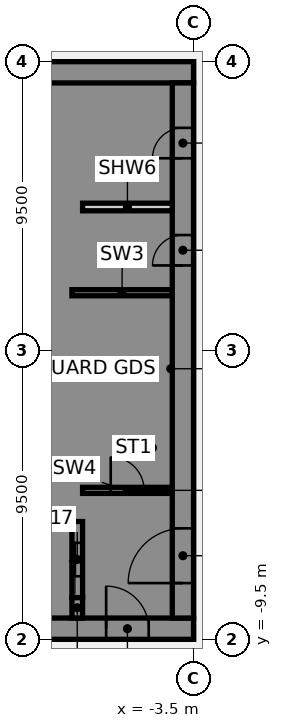
"""IFC4 building model, lengths in metres.
Left out: names, types, materials, properties, quantities, classifications, styles, units other than length and angle.
Written with IfcOpenShell. Run it as: python <this file> out.ifc"""

import sys

from ifc_helpers import new_model, si_unit, direction, frame, frame_2d, origin, place, context, subcontext, project, spatial, polyline, rectangle, outline, extrude, element, fill, save


model = new_model("IFC4")
c1 = context("Model", 3, precision=1e-05, world=origin(), true_north=direction((0.0, 1.0)))
c2 = subcontext(c1, "Body", "Model", "MODEL_VIEW")
j1 = project(units=[si_unit("LENGTHUNIT", "METRE"), si_unit("PLANEANGLEUNIT", "RADIAN")], contexts=[c1])
p1 = place(None, origin())
s1 = spatial("IfcSite", under=j1, at=p1, CompositionType="ELEMENT")
p2 = place(p1, origin())
s2 = spatial("IfcBuilding", under=s1, at=p2, CompositionType="ELEMENT")
p3 = place(p2, frame((0.0, 0.0, 75.25)))
s3 = spatial("IfcBuildingStorey", under=s2, at=p3, CompositionType="ELEMENT", Elevation=75.25)
p4 = place(p3, frame((-16.5, -9.15, 0.0), z_axis=(0.0, 0.0, 1.0), x_axis=(1.0, 0.0, 0.0)))
e1 = element("IfcWall", 1, at=p4, inside=s3, PredefinedType="SHEAR", context=c2, shape_type="SweptSolid", body=[
    extrude(rectangle(XDim=13.0, YDim=0.7, at=frame_2d((6.5, 0.0))), origin(), (0.0, 0.0, 1.0), 3.57),
])
p5 = place(p4, frame((4.15, 0.0, 0.0)))
e2 = element("IfcOpeningElement", 2, at=p5, cuts=e1, PredefinedType="OPENING", context=c2, shape_type="SweptSolid", body=[
    extrude(rectangle(XDim=1.4, YDim=2.1, at=frame_2d((0.7, 1.05))), frame((0.0, 0.36, 0.0), z_axis=(0.0, -1.0, 0.0), x_axis=(1.0, 0.0, 0.0)), (0.0, 0.0, 1.0), 0.72),
])
p6 = place(p4, frame((10.125, 0.0, 0.0)))
e3 = element("IfcOpeningElement", 3, at=p6, cuts=e1, PredefinedType="OPENING", context=c2, shape_type="SweptSolid", body=[
    extrude(rectangle(XDim=1.4, YDim=2.1, at=frame_2d((0.7, 1.05))), frame((0.0, 0.36, 0.0), z_axis=(0.0, -1.0, 0.0), x_axis=(1.0, 0.0, 0.0)), (0.0, 0.0, 1.0), 0.72),
])
p7 = place(p3, frame((-16.5, 9.15, 0.0), z_axis=(0.0, 0.0, 1.0), x_axis=(1.0, 0.0, 0.0)))
e4 = element("IfcWall", 4, at=p7, inside=s3, PredefinedType="SHEAR", context=c2, shape_type="SweptSolid", body=[
    extrude(rectangle(XDim=13.0, YDim=0.7, at=frame_2d((6.5, 0.0))), origin(), (0.0, 0.0, 1.0), 3.57),
])
p8 = place(p3, origin())
e5 = element("IfcWall", 5, at=p8, inside=s3, PredefinedType="SHEAR", context=c2, shape_type="SweptSolid", body=[
    extrude(outline(polyline([(-9.8, -5.375), (-9.8, -5.625), (-7.5, -5.625), (-7.15, -5.625), (-7.15, 8.8), (-7.5, 8.8), (-9.8, 8.8), (-9.8, 8.125), (-7.5, 8.125), (-7.5, 5.625), (-9.8, 5.625), (-9.8, 5.375), (-7.5, 5.375), (-7.5, 2.875), (-9.8, 2.875), (-9.8, 2.625), (-7.5, 2.625), (-7.5, 0.125), (-9.8, 0.125), (-9.8, -0.125), (-7.5, -0.125), (-7.5, -2.625), (-9.8, -2.625), (-9.8, -2.875), (-7.5, -2.875), (-7.5, -5.375), (-9.8, -5.375)])), origin(), (0.0, 0.0, 1.0), 3.57),
])
p9 = place(p3, origin())
e6 = element("IfcWall", 6, at=p9, inside=s3, PredefinedType="SHEAR", context=c2, shape_type="SweptSolid", body=[
    extrude(outline(polyline([(-7.5, -8.125), (-9.55, -8.125), (-9.55, -5.625), (-9.8, -5.625), (-9.8, -8.125), (-9.8, -8.8), (-7.5, -8.8), (-7.5, -8.125)])), origin(), (0.0, 0.0, 1.0), 3.57),
])
p10 = place(p3, frame((-7.325, -8.8, 0.0), z_axis=(0.0, 0.0, 1.0), x_axis=(0.0, 1.0, 0.0)))
e7 = element("IfcWall", 7, at=p10, inside=s3, PredefinedType="SHEAR", context=c2, shape_type="SweptSolid", body=[
    extrude(rectangle(XDim=0.675, YDim=0.35, at=frame_2d((0.337, 0.0))), origin(), (0.0, 0.0, 1.0), 3.57),
])
p11 = place(p3, frame((-7.5, 1.9, 0.0), z_axis=(0.0, 0.0, 1.0), x_axis=(1.0, 0.0, 0.0)))
e8 = element("IfcWall", 8, at=p11, inside=s3, PredefinedType="SHEAR", context=c2, shape_type="SweptSolid", body=[
    extrude(rectangle(XDim=3.3, YDim=0.2, at=frame_2d((1.65, 0.0))), origin(), (0.0, 0.0, 1.0), 3.57),
])
p12 = place(p3, frame((-7.325, -8.125, 0.0), z_axis=(0.0, 0.0, 1.0), x_axis=(0.0, 1.0, 0.0)))
e9 = element("IfcWall", 9, at=p12, inside=s3, PredefinedType="SHEAR", context=c2, shape_type="SweptSolid", body=[
    extrude(rectangle(XDim=2.5, YDim=0.35, at=frame_2d((1.25, 0.0))), origin(), (0.0, 0.0, 1.0), 3.57),
])
p13 = place(p12, frame((0.7, 0.0, 0.0)))
e10 = element("IfcOpeningElement", 10, at=p13, cuts=e9, PredefinedType="OPENING", context=c2, shape_type="SweptSolid", body=[
    extrude(rectangle(XDim=1.1, YDim=2.1, at=frame_2d((0.55, 1.05))), frame((0.0, 0.185, 0.0), z_axis=(0.0, -1.0, 0.0), x_axis=(1.0, 0.0, 0.0)), (0.0, 0.0, 1.0), 0.37),
])
p14 = place(p3, frame((-3.85, -8.8, 0.0), z_axis=(0.0, 0.0, 1.0), x_axis=(0.0, 1.0, 0.0)))
e11 = element("IfcWall", 11, at=p14, inside=s3, PredefinedType="SHEAR", context=c2, shape_type="SweptSolid", body=[
    extrude(rectangle(XDim=17.6, YDim=0.7, at=frame_2d((8.8, 0.0))), origin(), (0.0, 0.0, 1.0), 3.57),
])
p15 = place(p14, frame((1.15, 0.0, 0.0)))
e12 = element("IfcOpeningElement", 12, at=p15, cuts=e11, PredefinedType="OPENING", context=c2, shape_type="SweptSolid", body=[
    extrude(rectangle(XDim=1.8, YDim=2.1, at=frame_2d((0.9, 1.05))), frame((0.0, 0.36, 0.0), z_axis=(0.0, -1.0, 0.0), x_axis=(1.0, 0.0, 0.0)), (0.0, 0.0, 1.0), 0.72),
])
p16 = place(p14, frame((11.597, 0.0, 0.0)))
e13 = element("IfcOpeningElement", 13, at=p16, cuts=e11, PredefinedType="OPENING", context=c2, shape_type="SweptSolid", body=[
    extrude(rectangle(XDim=1.0, YDim=2.1, at=frame_2d((0.5, 1.05))), frame((0.0, 0.36, 0.0), z_axis=(0.0, -1.0, 0.0), x_axis=(1.0, 0.0, 0.0)), (0.0, 0.0, 1.0), 0.72),
])
p17 = place(p14, frame((15.123, 0.0, 0.0)))
e14 = element("IfcOpeningElement", 14, at=p17, cuts=e11, PredefinedType="OPENING", context=c2, shape_type="SweptSolid", body=[
    extrude(rectangle(XDim=1.0, YDim=2.1, at=frame_2d((0.5, 1.05))), frame((0.0, 0.36, 0.0), z_axis=(0.0, -1.0, 0.0), x_axis=(1.0, 0.0, 0.0)), (0.0, 0.0, 1.0), 0.72),
])
p18 = place(p3, frame((-7.15, 4.72, 0.0), z_axis=(0.0, 0.0, 1.0), x_axis=(1.0, 0.0, 0.0)))
e15 = element("IfcWall", 15, at=p18, inside=s3, PredefinedType="PARTITIONING", context=c2, shape_type="SweptSolid", body=[
    extrude(rectangle(XDim=2.95, YDim=0.25, at=frame_2d((1.475, 0.0))), origin(), (0.0, 0.0, 1.0), 3.57),
])
p19 = place(p3, frame((-7.15, -4.6, 0.0), z_axis=(0.0, 0.0, 1.0), x_axis=(1.0, 0.0, 0.0)))
e16 = element("IfcWall", 16, at=p19, inside=s3, PredefinedType="SHEAR", context=c2, shape_type="SweptSolid", body=[
    extrude(rectangle(XDim=2.95, YDim=0.2, at=frame_2d((1.475, 0.0))), origin(), (0.0, 0.0, 1.0), 3.57),
])
p20 = place(p19, frame((0.925, 0.0, 0.0)))
e17 = element("IfcOpeningElement", 17, at=p20, cuts=e16, PredefinedType="OPENING", context=c2, shape_type="SweptSolid", body=[
    extrude(rectangle(XDim=1.1, YDim=2.1, at=frame_2d((0.55, 1.05))), frame((0.0, 0.11, 0.0), z_axis=(0.0, -1.0, 0.0), x_axis=(1.0, 0.0, 0.0)), (0.0, 0.0, 1.0), 0.22),
])
p21 = place(p6, origin())
e18 = element("IfcDoor", 18, at=p21, inside=s3, OperationType="SINGLE_SWING_LEFT", PredefinedType="DOOR", context=c2, shape_type="SweptSolid", body=[
    extrude(rectangle(XDim=1.4, YDim=2.1, at=frame_2d((0.7, 1.05))), frame((0.0, 0.025, 0.0), z_axis=(0.0, -1.0, 0.0), x_axis=(1.0, 0.0, 0.0)), (0.0, 0.0, 1.0), 0.05),
])
fill(e3, e18)
p22 = place(p15, origin())
e19 = element("IfcDoor", 19, at=p22, inside=s3, OperationType="SINGLE_SWING_LEFT", PredefinedType="DOOR", context=c2, shape_type="SweptSolid", body=[
    extrude(rectangle(XDim=1.8, YDim=2.1, at=frame_2d((0.9, 1.05))), frame((0.0, 0.025, 0.0), z_axis=(0.0, -1.0, 0.0), x_axis=(1.0, 0.0, 0.0)), (0.0, 0.0, 1.0), 0.05),
])
fill(e12, e19)
p23 = place(p16, origin())
e20 = element("IfcDoor", 20, at=p23, inside=s3, OperationType="SINGLE_SWING_LEFT", PredefinedType="DOOR", context=c2, shape_type="SweptSolid", body=[
    extrude(rectangle(XDim=1.0, YDim=2.1, at=frame_2d((0.5, 1.05))), frame((0.0, 0.325, 0.0), z_axis=(0.0, -1.0, 0.0), x_axis=(1.0, 0.0, 0.0)), (0.0, 0.0, 1.0), 0.05),
])
fill(e13, e20)
p24 = place(p17, origin())
e21 = element("IfcDoor", 21, at=p24, inside=s3, OperationType="SINGLE_SWING_LEFT", PredefinedType="DOOR", context=c2, shape_type="SweptSolid", body=[
    extrude(rectangle(XDim=1.0, YDim=2.1, at=frame_2d((0.5, 1.05))), frame((0.0, 0.325, 0.0), z_axis=(0.0, -1.0, 0.0), x_axis=(1.0, 0.0, 0.0)), (0.0, 0.0, 1.0), 0.05),
])
fill(e14, e21)
p25 = place(p20, origin())
e22 = element("IfcDoor", 22, at=p25, inside=s3, OperationType="SINGLE_SWING_LEFT", PredefinedType="DOOR", context=c2, shape_type="SweptSolid", body=[
    extrude(rectangle(XDim=1.1, YDim=2.1, at=frame_2d((0.55, 1.05))), frame((0.0, 0.025, 0.0), z_axis=(0.0, -1.0, 0.0), x_axis=(1.0, 0.0, 0.0)), (0.0, 0.0, 1.0), 0.05),
])
fill(e17, e22)
p26 = place(p13, origin())
e23 = element("IfcDoor", 23, at=p26, inside=s3, OperationType="SLIDING_TO_LEFT", PredefinedType="DOOR", context=c2, shape_type="SweptSolid", body=[
    extrude(rectangle(XDim=1.1, YDim=2.1, at=frame_2d((0.55, 1.05))), frame((0.0, 0.025, 0.0), z_axis=(0.0, -1.0, 0.0), x_axis=(1.0, 0.0, 0.0)), (0.0, 0.0, 1.0), 0.05),
])
fill(e10, e23)
save(model, sys.argv[1])
